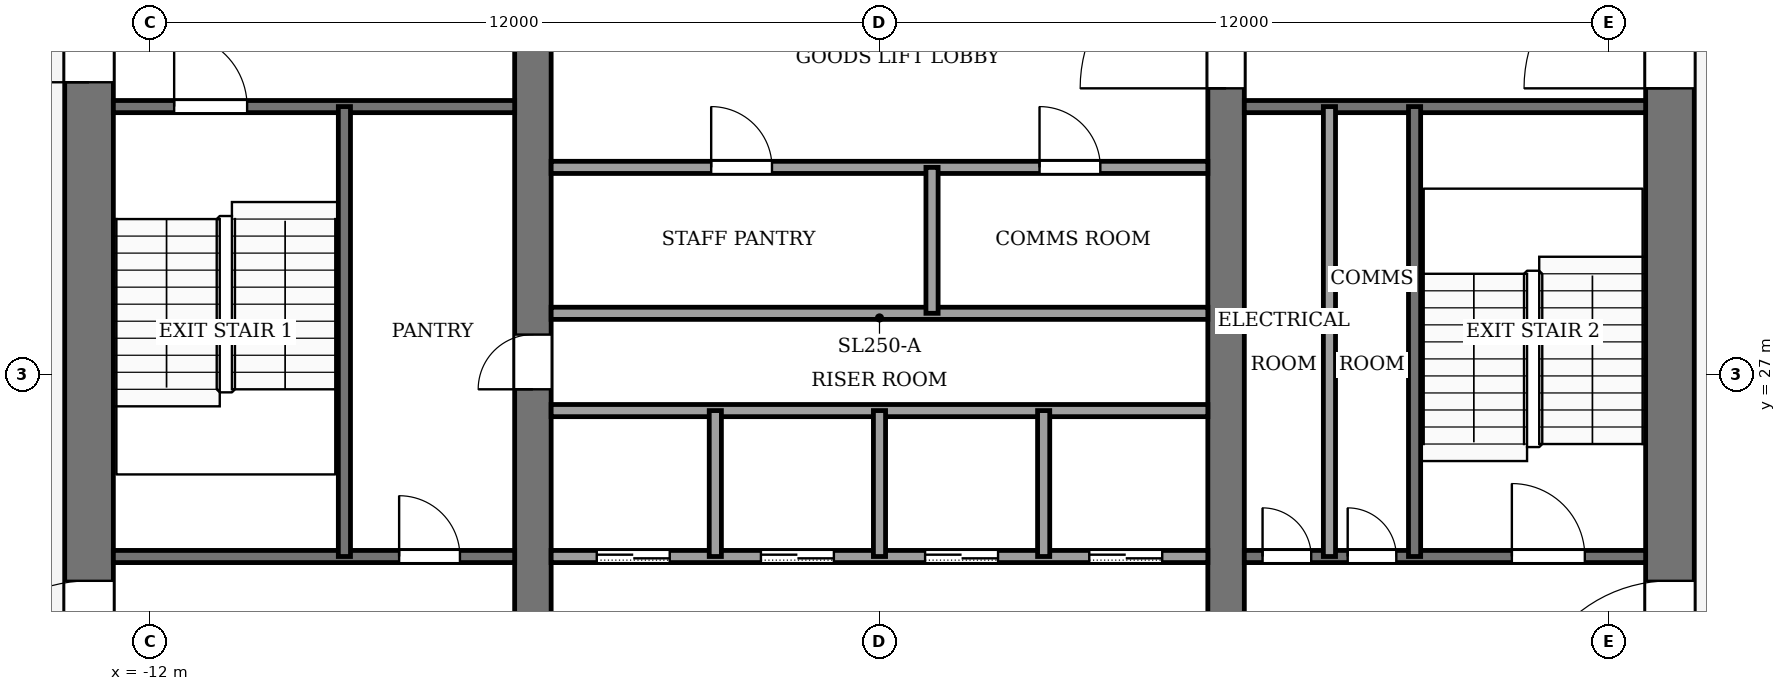
"""IFC4 building model, lengths in metres.
Left out: names, types, materials, properties, quantities, classifications, styles, units other than length and angle.
Written with IfcOpenShell. Run it as: python <this file> out.ifc"""

import sys

from ifc_helpers import new_model, si_unit, direction, frame, frame_2d, origin, place, context, subcontext, project, spatial, rectangle, extrude, element, fill, save


model = new_model("IFC4")
c1 = context("Model", 3, precision=1e-05, world=origin(), true_north=direction((0.0, 1.0)))
c2 = subcontext(c1, "Body", "Model", "MODEL_VIEW")
j1 = project(units=[si_unit("LENGTHUNIT", "METRE"), si_unit("PLANEANGLEUNIT", "RADIAN")], contexts=[c1])
p1 = place(None, origin())
s1 = spatial("IfcSite", under=j1, at=p1, CompositionType="ELEMENT")
p2 = place(p1, origin())
s2 = spatial("IfcBuilding", under=s1, at=p2, CompositionType="ELEMENT")
p3 = place(p2, frame((0.0, 0.0, 266.0)))
s3 = spatial("IfcBuildingStorey", under=s2, at=p3, CompositionType="ELEMENT", Elevation=266.0)
p4 = place(p3, frame((-13.0, 18.4, -0.13), z_axis=(0.0, 0.0, 1.0), x_axis=(0.0, 1.0, 0.0)))
e1 = element("IfcWall", 1, at=p4, inside=s3, PredefinedType="SHEAR", context=c2, shape_type="SweptSolid", body=[
    extrude(rectangle(XDim=19.2, YDim=0.8, at=frame_2d((9.6, 0.0))), origin(), (0.0, 0.0, 1.0), 4.0),
])
p5 = place(p4, frame((2.8, 0.0, 0.13)))
e2 = element("IfcOpeningElement", 2, at=p5, cuts=e1, PredefinedType="OPENING", context=c2, shape_type="SweptSolid", body=[
    extrude(rectangle(XDim=2.4, YDim=2.4, at=frame_2d((1.2, 1.2))), frame((0.0, 0.41, 0.0), z_axis=(0.0, -1.0, 0.0), x_axis=(1.0, 0.0, 0.0)), (0.0, 0.0, 1.0), 0.82),
])
p6 = place(p4, frame((13.4, 0.0, 0.13)))
e3 = element("IfcOpeningElement", 3, at=p6, cuts=e1, PredefinedType="OPENING", context=c2, shape_type="SweptSolid", body=[
    extrude(rectangle(XDim=1.4, YDim=2.2, at=frame_2d((0.7, 1.1))), frame((0.0, 0.41, 0.0), z_axis=(0.0, -1.0, 0.0), x_axis=(1.0, 0.0, 0.0)), (0.0, 0.0, 1.0), 0.82),
])
p7 = place(p3, frame((13.0, 18.4, -0.13), z_axis=(0.0, 0.0, 1.0), x_axis=(0.0, 1.0, 0.0)))
e4 = element("IfcWall", 4, at=p7, inside=s3, PredefinedType="SHEAR", context=c2, shape_type="SweptSolid", body=[
    extrude(rectangle(XDim=19.2, YDim=0.8, at=frame_2d((9.6, 0.0))), origin(), (0.0, 0.0, 1.0), 4.0),
])
p8 = place(p7, frame((2.8, 0.0, 0.13)))
e5 = element("IfcOpeningElement", 5, at=p8, cuts=e4, PredefinedType="OPENING", context=c2, shape_type="SweptSolid", body=[
    extrude(rectangle(XDim=2.4, YDim=2.4, at=frame_2d((1.2, 1.2))), frame((0.0, 0.41, 0.0), z_axis=(0.0, -1.0, 0.0), x_axis=(1.0, 0.0, 0.0)), (0.0, 0.0, 1.0), 0.82),
])
p9 = place(p7, frame((13.3, 0.0, 0.13)))
e6 = element("IfcOpeningElement", 6, at=p9, cuts=e4, PredefinedType="OPENING", context=c2, shape_type="SweptSolid", body=[
    extrude(rectangle(XDim=2.4, YDim=2.4, at=frame_2d((1.2, 1.2))), frame((0.0, 0.41, 0.0), z_axis=(0.0, -1.0, 0.0), x_axis=(1.0, 0.0, 0.0)), (0.0, 0.0, 1.0), 0.82),
])
p10 = place(p3, frame((-5.7, 18.4, -0.13), z_axis=(0.0, 0.0, 1.0), x_axis=(0.0, 1.0, 0.0)))
e7 = element("IfcWall", 7, at=p10, inside=s3, PredefinedType="SHEAR", context=c2, shape_type="SweptSolid", body=[
    extrude(rectangle(XDim=19.2, YDim=0.6, at=frame_2d((9.6, 0.0))), origin(), (0.0, 0.0, 1.0), 4.0),
])
p11 = place(p10, frame((8.35, 0.0, 0.13)))
e8 = element("IfcOpeningElement", 8, at=p11, cuts=e7, PredefinedType="OPENING", context=c2, shape_type="SweptSolid", body=[
    extrude(rectangle(XDim=0.9, YDim=2.1, at=frame_2d((0.45, 1.05))), frame((0.0, 0.31, 0.0), z_axis=(0.0, -1.0, 0.0), x_axis=(1.0, 0.0, 0.0)), (0.0, 0.0, 1.0), 0.62),
])
p12 = place(p3, frame((5.7, 18.4, -0.13), z_axis=(0.0, 0.0, 1.0), x_axis=(0.0, 1.0, 0.0)))
e9 = element("IfcWall", 9, at=p12, inside=s3, PredefinedType="SHEAR", context=c2, shape_type="SweptSolid", body=[
    extrude(rectangle(XDim=19.2, YDim=0.6, at=frame_2d((9.6, 0.0))), origin(), (0.0, 0.0, 1.0), 4.0),
])
p13 = place(p12, frame((13.3, 0.0, 0.13)))
e10 = element("IfcOpeningElement", 10, at=p13, cuts=e9, PredefinedType="OPENING", context=c2, shape_type="SweptSolid", body=[
    extrude(rectangle(XDim=2.4, YDim=2.4, at=frame_2d((1.2, 1.2))), frame((0.0, 0.31, 0.0), z_axis=(0.0, -1.0, 0.0), x_axis=(1.0, 0.0, 0.0)), (0.0, 0.0, 1.0), 0.62),
])
p14 = place(p3, frame((-12.6, 24.0, 0.0), z_axis=(0.0, 0.0, 1.0), x_axis=(1.0, 0.0, 0.0)))
e11 = element("IfcWall", 11, at=p14, inside=s3, PredefinedType="PARTITIONING", context=c2, shape_type="SweptSolid", body=[
    extrude(rectangle(XDim=6.6, YDim=0.2, at=frame_2d((3.3, 0.0))), origin(), (0.0, 0.0, 1.0), 3.87),
])
p15 = place(p14, frame((4.7, 0.0, 0.0)))
e12 = element("IfcOpeningElement", 12, at=p15, cuts=e11, PredefinedType="OPENING", context=c2, shape_type="SweptSolid", body=[
    extrude(rectangle(XDim=1.0, YDim=2.1, at=frame_2d((0.5, 1.05))), frame((0.0, 0.11, 0.0), z_axis=(0.0, -1.0, 0.0), x_axis=(1.0, 0.0, 0.0)), (0.0, 0.0, 1.0), 0.22),
])
p16 = place(p3, frame((-5.4, 24.0, 0.0), z_axis=(0.0, 0.0, 1.0), x_axis=(1.0, 0.0, 0.0)))
e13 = element("IfcWall", 13, at=p16, inside=s3, PredefinedType="PARTITIONING", context=c2, shape_type="SweptSolid", body=[
    extrude(rectangle(XDim=10.8, YDim=0.2, at=frame_2d((5.4, 0.0))), origin(), (0.0, 0.0, 1.0), 3.87),
])
p17 = place(p16, frame((0.75, 0.0, 0.0)))
e14 = element("IfcOpeningElement", 14, at=p17, cuts=e13, PredefinedType="OPENING", context=c2, shape_type="SweptSolid", body=[
    extrude(rectangle(XDim=1.2, YDim=2.2, at=frame_2d((0.6, 1.1))), frame((0.0, 0.11, 0.0), z_axis=(0.0, -1.0, 0.0), x_axis=(1.0, 0.0, 0.0)), (0.0, 0.0, 1.0), 0.22),
])
p18 = place(p16, frame((3.45, 0.0, 0.0)))
e15 = element("IfcOpeningElement", 15, at=p18, cuts=e13, PredefinedType="OPENING", context=c2, shape_type="SweptSolid", body=[
    extrude(rectangle(XDim=1.2, YDim=2.2, at=frame_2d((0.6, 1.1))), frame((0.0, 0.11, 0.0), z_axis=(0.0, -1.0, 0.0), x_axis=(1.0, 0.0, 0.0)), (0.0, 0.0, 1.0), 0.22),
])
p19 = place(p16, frame((6.15, 0.0, 0.0)))
e16 = element("IfcOpeningElement", 16, at=p19, cuts=e13, PredefinedType="OPENING", context=c2, shape_type="SweptSolid", body=[
    extrude(rectangle(XDim=1.2, YDim=2.2, at=frame_2d((0.6, 1.1))), frame((0.0, 0.11, 0.0), z_axis=(0.0, -1.0, 0.0), x_axis=(1.0, 0.0, 0.0)), (0.0, 0.0, 1.0), 0.22),
])
p20 = place(p16, frame((8.85, 0.0, 0.0)))
e17 = element("IfcOpeningElement", 17, at=p20, cuts=e13, PredefinedType="OPENING", context=c2, shape_type="SweptSolid", body=[
    extrude(rectangle(XDim=1.2, YDim=2.2, at=frame_2d((0.6, 1.1))), frame((0.0, 0.11, 0.0), z_axis=(0.0, -1.0, 0.0), x_axis=(1.0, 0.0, 0.0)), (0.0, 0.0, 1.0), 0.22),
])
p21 = place(p3, frame((6.0, 24.0, 0.0), z_axis=(0.0, 0.0, 1.0), x_axis=(1.0, 0.0, 0.0)))
e18 = element("IfcWall", 18, at=p21, inside=s3, PredefinedType="PARTITIONING", context=c2, shape_type="SweptSolid", body=[
    extrude(rectangle(XDim=6.6, YDim=0.2, at=frame_2d((3.3, 0.0))), origin(), (0.0, 0.0, 1.0), 3.87),
])
p22 = place(p21, frame((0.3, 0.0, 0.0)))
e19 = element("IfcOpeningElement", 19, at=p22, cuts=e18, PredefinedType="OPENING", context=c2, shape_type="SweptSolid", body=[
    extrude(rectangle(XDim=0.8, YDim=2.1, at=frame_2d((0.4, 1.05))), frame((0.0, 0.11, 0.0), z_axis=(0.0, -1.0, 0.0), x_axis=(1.0, 0.0, 0.0)), (0.0, 0.0, 1.0), 0.22),
])
p23 = place(p21, frame((1.7, 0.0, 0.0)))
e20 = element("IfcOpeningElement", 20, at=p23, cuts=e18, PredefinedType="OPENING", context=c2, shape_type="SweptSolid", body=[
    extrude(rectangle(XDim=0.8, YDim=2.1, at=frame_2d((0.4, 1.05))), frame((0.0, 0.11, 0.0), z_axis=(0.0, -1.0, 0.0), x_axis=(1.0, 0.0, 0.0)), (0.0, 0.0, 1.0), 0.22),
])
p24 = place(p21, frame((4.4, 0.0, 0.0)))
e21 = element("IfcOpeningElement", 21, at=p24, cuts=e18, PredefinedType="OPENING", context=c2, shape_type="SweptSolid", body=[
    extrude(rectangle(XDim=1.2, YDim=2.2, at=frame_2d((0.6, 1.1))), frame((0.0, 0.11, 0.0), z_axis=(0.0, -1.0, 0.0), x_axis=(1.0, 0.0, 0.0)), (0.0, 0.0, 1.0), 0.22),
])
for number, where, z_axis, x_axis in (
    (22, (-5.4, 26.4, 0.0), (0.0, 0.0, 1.0), (1.0, 0.0, 0.0)),
    (23, (-5.4, 28.0, 0.0), (0.0, 0.0, 1.0), (1.0, 0.0, 0.0)),
):
    element("IfcWall", number, at=place(p3, frame(where, z_axis=z_axis, x_axis=x_axis)), inside=s3, PredefinedType="PARTITIONING", context=c2, shape_type="SweptSolid", body=[
        extrude(rectangle(XDim=10.8, YDim=0.2, at=frame_2d((5.4, 0.0))), origin(), (0.0, 0.0, 1.0), 3.87),
    ])
p25 = place(p3, frame((-5.4, 30.4, 0.0), z_axis=(0.0, 0.0, 1.0), x_axis=(1.0, 0.0, 0.0)))
e24 = element("IfcWall", 24, at=p25, inside=s3, PredefinedType="PARTITIONING", context=c2, shape_type="SweptSolid", body=[
    extrude(rectangle(XDim=10.8, YDim=0.2, at=frame_2d((5.4, 0.0))), origin(), (0.0, 0.0, 1.0), 3.87),
])
p26 = place(p25, frame((2.632, 0.0, 0.0)))
e25 = element("IfcOpeningElement", 25, at=p26, cuts=e24, PredefinedType="OPENING", context=c2, shape_type="SweptSolid", body=[
    extrude(rectangle(XDim=1.0, YDim=2.1, at=frame_2d((0.5, 1.05))), frame((0.0, 0.11, 0.0), z_axis=(0.0, -1.0, 0.0), x_axis=(1.0, 0.0, 0.0)), (0.0, 0.0, 1.0), 0.22),
])
p27 = place(p25, frame((8.032, 0.0, 0.0)))
e26 = element("IfcOpeningElement", 26, at=p27, cuts=e24, PredefinedType="OPENING", context=c2, shape_type="SweptSolid", body=[
    extrude(rectangle(XDim=1.0, YDim=2.1, at=frame_2d((0.5, 1.05))), frame((0.0, 0.11, 0.0), z_axis=(0.0, -1.0, 0.0), x_axis=(1.0, 0.0, 0.0)), (0.0, 0.0, 1.0), 0.22),
])
p28 = place(p3, frame((-12.6, 31.4, 0.0), z_axis=(0.0, 0.0, 1.0), x_axis=(1.0, 0.0, 0.0)))
e27 = element("IfcWall", 27, at=p28, inside=s3, PredefinedType="PARTITIONING", context=c2, shape_type="SweptSolid", body=[
    extrude(rectangle(XDim=6.6, YDim=0.2, at=frame_2d((3.3, 0.0))), origin(), (0.0, 0.0, 1.0), 3.87),
])
p29 = place(p28, frame((1.0, 0.0, 0.0)))
e28 = element("IfcOpeningElement", 28, at=p29, cuts=e27, PredefinedType="OPENING", context=c2, shape_type="SweptSolid", body=[
    extrude(rectangle(XDim=1.2, YDim=2.2, at=frame_2d((0.6, 1.1))), frame((0.0, 0.11, 0.0), z_axis=(0.0, -1.0, 0.0), x_axis=(1.0, 0.0, 0.0)), (0.0, 0.0, 1.0), 0.22),
])
p30 = place(p3, frame((6.0, 31.4, 0.0), z_axis=(0.0, 0.0, 1.0), x_axis=(1.0, 0.0, 0.0)))
e29 = element("IfcWall", 29, at=p30, inside=s3, PredefinedType="PARTITIONING", context=c2, shape_type="SweptSolid", body=[
    extrude(rectangle(XDim=6.6, YDim=0.2, at=frame_2d((3.3, 0.0))), origin(), (0.0, 0.0, 1.0), 3.87),
])
p31 = place(p3, frame((-8.8, 24.0, 0.0), z_axis=(0.0, 0.0, 1.0), x_axis=(0.0, 1.0, 0.0)))
e30 = element("IfcWall", 30, at=p31, inside=s3, PredefinedType="PARTITIONING", context=c2, shape_type="SweptSolid", body=[
    extrude(rectangle(XDim=7.4, YDim=0.2, at=frame_2d((3.7, 0.0))), origin(), (0.0, 0.0, 1.0), 3.87),
])
for number, where, z_axis, x_axis in (
    (31, (-2.7, 24.0, 0.0), (0.0, 0.0, 1.0), (0.0, 1.0, 0.0)),
    (32, (0.0, 24.0, 0.0), (0.0, 0.0, 1.0), (0.0, 1.0, 0.0)),
    (33, (0.864, 28.0, 0.0), (0.0, 0.0, 1.0), (0.0, 1.0, 0.0)),
    (34, (2.7, 24.0, 0.0), (0.0, 0.0, 1.0), (0.0, 1.0, 0.0)),
):
    element("IfcWall", number, at=place(p3, frame(where, z_axis=z_axis, x_axis=x_axis)), inside=s3, PredefinedType="PARTITIONING", context=c2, shape_type="SweptSolid", body=[
        extrude(rectangle(XDim=2.4, YDim=0.2, at=frame_2d((1.2, 0.0))), origin(), (0.0, 0.0, 1.0), 3.87),
    ])
for number, where, z_axis, x_axis in (
    (35, (7.4, 24.0, 0.0), (0.0, 0.0, 1.0), (0.0, 1.0, 0.0)),
    (36, (8.8, 24.0, 0.0), (0.0, 0.0, 1.0), (0.0, 1.0, 0.0)),
):
    element("IfcWall", number, at=place(p3, frame(where, z_axis=z_axis, x_axis=x_axis)), inside=s3, PredefinedType="PARTITIONING", context=c2, shape_type="SweptSolid", body=[
        extrude(rectangle(XDim=7.4, YDim=0.2, at=frame_2d((3.7, 0.0))), origin(), (0.0, 0.0, 1.0), 3.87),
    ])
p32 = place(p17, origin())
e37 = element("IfcDoor", 37, at=p32, inside=s3, OperationType="SLIDING_TO_LEFT", PredefinedType="DOOR", context=c2, shape_type="SweptSolid", body=[
    extrude(rectangle(XDim=1.2, YDim=2.2, at=frame_2d((0.6, 1.1))), frame((0.0, 0.025, 0.0), z_axis=(0.0, -1.0, 0.0), x_axis=(1.0, 0.0, 0.0)), (0.0, 0.0, 1.0), 0.05),
])
fill(e14, e37)
p33 = place(p18, origin())
e38 = element("IfcDoor", 38, at=p33, inside=s3, OperationType="SLIDING_TO_LEFT", PredefinedType="DOOR", context=c2, shape_type="SweptSolid", body=[
    extrude(rectangle(XDim=1.2, YDim=2.2, at=frame_2d((0.6, 1.1))), frame((0.0, 0.025, 0.0), z_axis=(0.0, -1.0, 0.0), x_axis=(1.0, 0.0, 0.0)), (0.0, 0.0, 1.0), 0.05),
])
fill(e15, e38)
p34 = place(p19, origin())
e39 = element("IfcDoor", 39, at=p34, inside=s3, OperationType="SLIDING_TO_LEFT", PredefinedType="DOOR", context=c2, shape_type="SweptSolid", body=[
    extrude(rectangle(XDim=1.2, YDim=2.2, at=frame_2d((0.6, 1.1))), frame((0.0, 0.025, 0.0), z_axis=(0.0, -1.0, 0.0), x_axis=(1.0, 0.0, 0.0)), (0.0, 0.0, 1.0), 0.05),
])
fill(e16, e39)
p35 = place(p20, origin())
e40 = element("IfcDoor", 40, at=p35, inside=s3, OperationType="SLIDING_TO_LEFT", PredefinedType="DOOR", context=c2, shape_type="SweptSolid", body=[
    extrude(rectangle(XDim=1.2, YDim=2.2, at=frame_2d((0.6, 1.1))), frame((0.0, 0.025, 0.0), z_axis=(0.0, -1.0, 0.0), x_axis=(1.0, 0.0, 0.0)), (0.0, 0.0, 1.0), 0.05),
])
fill(e17, e40)
p36 = place(p26, origin())
e41 = element("IfcDoor", 41, at=p36, inside=s3, OperationType="SINGLE_SWING_LEFT", PredefinedType="DOOR", context=c2, shape_type="SweptSolid", body=[
    extrude(rectangle(XDim=1.0, YDim=2.1, at=frame_2d((0.5, 1.05))), frame((0.0, 0.025, 0.0), z_axis=(0.0, -1.0, 0.0), x_axis=(1.0, 0.0, 0.0)), (0.0, 0.0, 1.0), 0.05),
])
fill(e25, e41)
p37 = place(p27, origin())
e42 = element("IfcDoor", 42, at=p37, inside=s3, OperationType="SINGLE_SWING_RIGHT", PredefinedType="DOOR", context=c2, shape_type="SweptSolid", body=[
    extrude(rectangle(XDim=1.0, YDim=2.1, at=frame_2d((0.5, 1.05))), frame((0.0, 0.025, 0.0), z_axis=(0.0, -1.0, 0.0), x_axis=(1.0, 0.0, 0.0)), (0.0, 0.0, 1.0), 0.05),
])
fill(e26, e42)
p38 = place(p15, origin())
e43 = element("IfcDoor", 43, at=p38, inside=s3, OperationType="SINGLE_SWING_LEFT", PredefinedType="DOOR", context=c2, shape_type="SweptSolid", body=[
    extrude(rectangle(XDim=1.0, YDim=2.1, at=frame_2d((0.5, 1.05))), frame((0.0, 0.025, 0.0), z_axis=(0.0, -1.0, 0.0), x_axis=(1.0, 0.0, 0.0)), (0.0, 0.0, 1.0), 0.05),
])
fill(e12, e43)
p39 = place(p22, origin())
e44 = element("IfcDoor", 44, at=p39, inside=s3, OperationType="SINGLE_SWING_LEFT", PredefinedType="DOOR", context=c2, shape_type="SweptSolid", body=[
    extrude(rectangle(XDim=0.8, YDim=2.1, at=frame_2d((0.4, 1.05))), frame((0.0, 0.025, 0.0), z_axis=(0.0, -1.0, 0.0), x_axis=(1.0, 0.0, 0.0)), (0.0, 0.0, 1.0), 0.05),
])
fill(e19, e44)
p40 = place(p23, origin())
e45 = element("IfcDoor", 45, at=p40, inside=s3, OperationType="SINGLE_SWING_RIGHT", PredefinedType="DOOR", context=c2, shape_type="SweptSolid", body=[
    extrude(rectangle(XDim=0.8, YDim=2.1, at=frame_2d((0.4, 1.05))), frame((0.0, 0.025, 0.0), z_axis=(0.0, -1.0, 0.0), x_axis=(1.0, 0.0, 0.0)), (0.0, 0.0, 1.0), 0.05),
])
fill(e20, e45)
p41 = place(p11, origin())
e46 = element("IfcDoor", 46, at=p41, inside=s3, OperationType="SINGLE_SWING_RIGHT", PredefinedType="DOOR", context=c2, shape_type="SweptSolid", body=[
    extrude(rectangle(XDim=0.9, YDim=2.1, at=frame_2d((0.45, 1.05))), frame((0.0, 0.025, 0.0), z_axis=(0.0, -1.0, 0.0), x_axis=(1.0, 0.0, 0.0)), (0.0, 0.0, 1.0), 0.05),
])
fill(e8, e46)
p42 = place(p29, origin())
e47 = element("IfcDoor", 47, at=p42, inside=s3, OperationType="SINGLE_SWING_RIGHT", PredefinedType="DOOR", context=c2, shape_type="SweptSolid", body=[
    extrude(rectangle(XDim=1.2, YDim=2.2, at=frame_2d((0.6, 1.1))), frame((0.0, 0.025, 0.0), z_axis=(0.0, -1.0, 0.0), x_axis=(1.0, 0.0, 0.0)), (0.0, 0.0, 1.0), 0.05),
])
fill(e28, e47)
p43 = place(p24, origin())
e48 = element("IfcDoor", 48, at=p43, inside=s3, OperationType="SINGLE_SWING_LEFT", PredefinedType="DOOR", context=c2, shape_type="SweptSolid", body=[
    extrude(rectangle(XDim=1.2, YDim=2.2, at=frame_2d((0.6, 1.1))), frame((0.0, 0.025, 0.0), z_axis=(0.0, -1.0, 0.0), x_axis=(1.0, 0.0, 0.0)), (0.0, 0.0, 1.0), 0.05),
])
fill(e21, e48)
p44 = place(p13, origin())
e49 = element("IfcDoor", 49, at=p44, inside=s3, OperationType="DOUBLE_DOOR_SINGLE_SWING", PredefinedType="DOOR", context=c2, shape_type="SweptSolid", body=[
    extrude(rectangle(XDim=2.4, YDim=2.4, at=frame_2d((1.2, 1.2))), frame((0.0, 0.025, 0.0), z_axis=(0.0, -1.0, 0.0), x_axis=(1.0, 0.0, 0.0)), (0.0, 0.0, 1.0), 0.05),
])
fill(e10, e49)
p45 = place(p5, origin())
e50 = element("IfcDoor", 50, at=p45, inside=s3, OperationType="DOUBLE_DOOR_SINGLE_SWING", PredefinedType="DOOR", context=c2, shape_type="SweptSolid", body=[
    extrude(rectangle(XDim=2.4, YDim=2.4, at=frame_2d((1.2, 1.2))), frame((0.0, 0.025, 0.0), z_axis=(0.0, -1.0, 0.0), x_axis=(1.0, 0.0, 0.0)), (0.0, 0.0, 1.0), 0.05),
])
fill(e2, e50)
p46 = place(p8, origin())
e51 = element("IfcDoor", 51, at=p46, inside=s3, OperationType="DOUBLE_DOOR_SINGLE_SWING", PredefinedType="DOOR", context=c2, shape_type="SweptSolid", body=[
    extrude(rectangle(XDim=2.4, YDim=2.4, at=frame_2d((1.2, 1.2))), frame((0.0, 0.025, 0.0), z_axis=(0.0, -1.0, 0.0), x_axis=(1.0, 0.0, 0.0)), (0.0, 0.0, 1.0), 0.05),
])
fill(e5, e51)
p47 = place(p9, origin())
e52 = element("IfcDoor", 52, at=p47, inside=s3, OperationType="DOUBLE_DOOR_SINGLE_SWING", PredefinedType="DOOR", context=c2, shape_type="SweptSolid", body=[
    extrude(rectangle(XDim=2.4, YDim=2.4, at=frame_2d((1.2, 1.2))), frame((0.0, 0.025, 0.0), z_axis=(0.0, -1.0, 0.0), x_axis=(1.0, 0.0, 0.0)), (0.0, 0.0, 1.0), 0.05),
])
fill(e6, e52)
p48 = place(p6, origin())
e53 = element("IfcDoor", 53, at=p48, inside=s3, OperationType="SINGLE_SWING_RIGHT", PredefinedType="DOOR", context=c2, shape_type="SweptSolid", body=[
    extrude(rectangle(XDim=1.4, YDim=2.2, at=frame_2d((0.7, 1.1))), frame((0.0, 0.025, 0.0), z_axis=(0.0, -1.0, 0.0), x_axis=(1.0, 0.0, 0.0)), (0.0, 0.0, 1.0), 0.05),
])
fill(e3, e53)
save(model, sys.argv[1])
